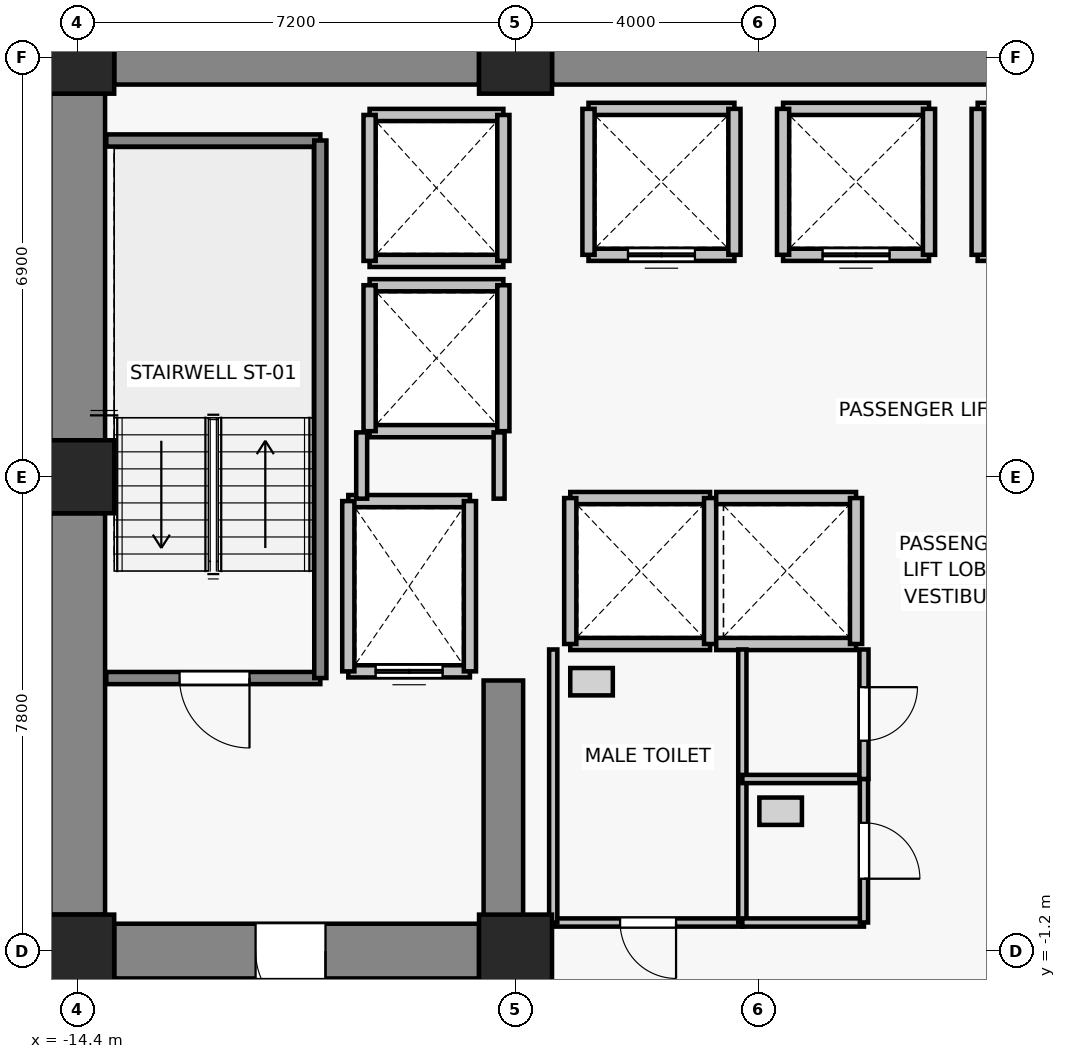
"""IFC4 building model, lengths in metres.
Left out: names, types, materials, properties, quantities, classifications, styles, units other than length and angle.
Written with IfcOpenShell. Run it as: python <this file> out.ifc"""

import sys

from ifc_helpers import new_model, si_unit, direction, frame, frame_2d, origin, origin_2d, place, context, subcontext, project, spatial, rectangle, extrude, source, transform, mapped, element, fill, save


model = new_model("IFC4")
c1 = context("Model", 3, precision=1e-05, world=origin(), true_north=direction((0.0, 1.0)))
c2 = subcontext(c1, "Body", "Model", "MODEL_VIEW")
j1 = project(units=[si_unit("LENGTHUNIT", "METRE"), si_unit("PLANEANGLEUNIT", "RADIAN")], contexts=[c1])
p1 = place(None, origin())
s1 = spatial("IfcSite", under=j1, at=p1, CompositionType="ELEMENT")
p2 = place(p1, origin())
s2 = spatial("IfcBuilding", under=s1, at=p2, CompositionType="ELEMENT")
p3 = place(p2, frame((0.0, 0.0, 67.0)))
s3 = spatial("IfcBuildingStorey", under=s2, at=p3, CompositionType="ELEMENT", Elevation=67.0)
for number, where, z_axis, x_axis in (
    (1, (-14.4, -1.2, 0.0), (0.0, 0.0, 1.0), (1.0, 0.0, 0.0)),
    (2, (-7.2, -1.2, 0.0), (0.0, 0.0, 1.0), (1.0, 0.0, 0.0)),
    (3, (-14.4, 6.6, 0.0), (0.0, 0.0, 1.0), (1.0, 0.0, 0.0)),
    (4, (-14.4, 13.5, 0.0), (0.0, 0.0, 1.0), (1.0, 0.0, 0.0)),
    (5, (-7.2, 13.5, 0.0), (0.0, 0.0, 1.0), (1.0, 0.0, 0.0)),
):
    element("IfcColumn", number, at=place(p3, frame(where, z_axis=z_axis, x_axis=x_axis)), inside=s3, PredefinedType="COLUMN", context=c2, shape_type="SweptSolid", body=[
        extrude(rectangle(XDim=1.2, YDim=1.2, at=origin_2d()), origin(), (0.0, 0.0, 1.0), 3.3),
    ])
p4 = place(p3, frame((-13.8, 13.5, 0.0), z_axis=(0.0, 0.0, 1.0), x_axis=(1.0, 0.0, 0.0)))
e6 = element("IfcWall", 6, at=p4, inside=s3, PredefinedType="SHEAR", context=c2, shape_type="SweptSolid", body=[
    extrude(rectangle(XDim=6.0, YDim=0.9, at=frame_2d((3.0, 0.0))), origin(), (0.0, 0.0, 1.0), 3.075),
])
p5 = place(p3, frame((-6.6, 13.5, 0.0), z_axis=(0.0, 0.0, 1.0), x_axis=(1.0, 0.0, 0.0)))
e7 = element("IfcWall", 7, at=p5, inside=s3, PredefinedType="SHEAR", context=c2, shape_type="SweptSolid", body=[
    extrude(rectangle(XDim=13.2, YDim=0.9, at=frame_2d((6.6, 0.0))), origin(), (0.0, 0.0, 1.0), 3.075),
])
p6 = place(p3, frame((-14.4, -0.6, 0.0), z_axis=(0.0, 0.0, 1.0), x_axis=(0.0, 1.0, 0.0)))
e8 = element("IfcWall", 8, at=p6, inside=s3, PredefinedType="SHEAR", context=c2, shape_type="SweptSolid", body=[
    extrude(rectangle(XDim=6.6, YDim=0.9, at=frame_2d((3.3, 0.0))), origin(), (0.0, 0.0, 1.0), 3.075),
])
p7 = place(p3, frame((-14.4, 7.2, 0.0), z_axis=(0.0, 0.0, 1.0), x_axis=(0.0, 1.0, 0.0)))
e9 = element("IfcWall", 9, at=p7, inside=s3, PredefinedType="SHEAR", context=c2, shape_type="SweptSolid", body=[
    extrude(rectangle(XDim=5.7, YDim=0.9, at=frame_2d((2.85, 0.0))), origin(), (0.0, 0.0, 1.0), 3.075),
])
p8 = place(p3, frame((-7.8, -1.2, 0.0), z_axis=(0.0, 0.0, 1.0), x_axis=(-1.0, 0.0, 0.0)))
e10 = element("IfcWall", 10, at=p8, inside=s3, PredefinedType="SHEAR", context=c2, shape_type="SweptSolid", body=[
    extrude(rectangle(XDim=6.0, YDim=0.9, at=frame_2d((3.0, 0.0))), origin(), (0.0, 0.0, 1.0), 3.075),
])
p9 = place(p8, frame((2.525, 0.0, 0.0)))
e11 = element("IfcOpeningElement", 11, at=p9, cuts=e10, PredefinedType="OPENING", context=c2, shape_type="SweptSolid", body=[
    extrude(rectangle(XDim=1.15, YDim=2.15, at=frame_2d((0.575, 1.075))), frame((0.0, 0.46, 0.0), z_axis=(0.0, -1.0, 0.0), x_axis=(1.0, 0.0, 0.0)), (0.0, 0.0, 1.0), 0.92),
])
p10 = place(p3, frame((-7.4, -0.75, 0.0), z_axis=(0.0, 0.0, 1.0), x_axis=(0.0, 1.0, 0.0)))
e12 = element("IfcWall", 12, at=p10, inside=s3, PredefinedType="SHEAR", context=c2, shape_type="SweptSolid", body=[
    extrude(rectangle(XDim=4.0, YDim=0.65, at=frame_2d((2.0, 0.0))), origin(), (0.0, 0.0, 1.0), 3.075),
])
p11 = place(p3, frame((-7.95, 3.4, 0.0), z_axis=(0.0, 0.0, 1.0), x_axis=(-1.0, 0.0, 0.0)))
e13 = element("IfcWall", 13, at=p11, inside=s3, PredefinedType="SOLIDWALL", context=c2, shape_type="SweptSolid", body=[
    extrude(rectangle(XDim=2.0, YDim=0.2, at=frame_2d((1.0, 0.0))), origin(), (0.0, 0.0, 1.0), 3.075),
])
p12 = place(p11, frame((0.45, 0.0, 0.0)))
e14 = element("IfcOpeningElement", 14, at=p12, cuts=e13, PredefinedType="OPENING", context=c2, shape_type="SweptSolid", body=[
    extrude(rectangle(XDim=1.1, YDim=2.2, at=frame_2d((0.55, 1.1))), frame((0.0, 0.11, 0.0), z_axis=(0.0, -1.0, 0.0), x_axis=(1.0, 0.0, 0.0)), (0.0, 0.0, 1.0), 0.22),
])
p13 = place(p3, frame((-9.95, 6.2, 0.0), z_axis=(0.0, 0.0, 1.0), x_axis=(1.0, 0.0, 0.0)))
e15 = element("IfcWall", 15, at=p13, inside=s3, PredefinedType="SOLIDWALL", context=c2, shape_type="SweptSolid", body=[
    extrude(rectangle(XDim=2.0, YDim=0.2, at=frame_2d((1.0, 0.0))), origin(), (0.0, 0.0, 1.0), 3.075),
])
for number, where, z_axis, x_axis in (
    (16, (-9.95, 3.4, 0.0), (0.0, 0.0, 1.0), (0.0, 1.0, 0.0)),
    (17, (-7.95, 6.2, 0.0), (0.0, 0.0, 1.0), (0.0, -1.0, 0.0)),
):
    element("IfcWall", number, at=place(p3, frame(where, z_axis=z_axis, x_axis=x_axis)), inside=s3, PredefinedType="SOLIDWALL", context=c2, shape_type="SweptSolid", body=[
        extrude(rectangle(XDim=2.8, YDim=0.2, at=frame_2d((1.4, 0.0))), origin(), (0.0, 0.0, 1.0), 3.075),
    ])
p14 = place(p3, frame((-3.6, 10.25, 0.0), z_axis=(0.0, 0.0, 1.0), x_axis=(-1.0, 0.0, 0.0)))
e18 = element("IfcWall", 18, at=p14, inside=s3, PredefinedType="SOLIDWALL", context=c2, shape_type="SweptSolid", body=[
    extrude(rectangle(XDim=2.4, YDim=0.2, at=frame_2d((1.2, 0.0))), origin(), (0.0, 0.0, 1.0), 3.075),
])
p15 = place(p14, frame((0.65, 0.0, 0.0)))
e19 = element("IfcOpeningElement", 19, at=p15, cuts=e18, PredefinedType="OPENING", context=c2, shape_type="SweptSolid", body=[
    extrude(rectangle(XDim=1.1, YDim=2.2, at=frame_2d((0.55, 1.1))), frame((0.0, 0.11, 0.0), z_axis=(0.0, -1.0, 0.0), x_axis=(1.0, 0.0, 0.0)), (0.0, 0.0, 1.0), 0.22),
])
for number, where, z_axis, x_axis in (
    (20, (-6.0, 12.65, 0.0), (0.0, 0.0, 1.0), (1.0, 0.0, 0.0)),
    (21, (-6.0, 10.25, 0.0), (0.0, 0.0, 1.0), (0.0, 1.0, 0.0)),
    (22, (-3.6, 12.65, 0.0), (0.0, 0.0, 1.0), (0.0, -1.0, 0.0)),
):
    element("IfcWall", number, at=place(p3, frame(where, z_axis=z_axis, x_axis=x_axis)), inside=s3, PredefinedType="SOLIDWALL", context=c2, shape_type="SweptSolid", body=[
        extrude(rectangle(XDim=2.4, YDim=0.2, at=frame_2d((1.2, 0.0))), origin(), (0.0, 0.0, 1.0), 3.075),
    ])
p16 = place(p3, frame((-0.4, 10.25, 0.0), z_axis=(0.0, 0.0, 1.0), x_axis=(-1.0, 0.0, 0.0)))
e23 = element("IfcWall", 23, at=p16, inside=s3, PredefinedType="SOLIDWALL", context=c2, shape_type="SweptSolid", body=[
    extrude(rectangle(XDim=2.4, YDim=0.2, at=frame_2d((1.2, 0.0))), origin(), (0.0, 0.0, 1.0), 3.075),
])
p17 = place(p16, frame((0.65, 0.0, 0.0)))
e24 = element("IfcOpeningElement", 24, at=p17, cuts=e23, PredefinedType="OPENING", context=c2, shape_type="SweptSolid", body=[
    extrude(rectangle(XDim=1.1, YDim=2.2, at=frame_2d((0.55, 1.1))), frame((0.0, 0.11, 0.0), z_axis=(0.0, -1.0, 0.0), x_axis=(1.0, 0.0, 0.0)), (0.0, 0.0, 1.0), 0.22),
])
p18 = place(p3, frame((-2.8, 12.65, 0.0), z_axis=(0.0, 0.0, 1.0), x_axis=(1.0, 0.0, 0.0)))
e25 = element("IfcWall", 25, at=p18, inside=s3, PredefinedType="SOLIDWALL", context=c2, shape_type="SweptSolid", body=[
    extrude(rectangle(XDim=2.4, YDim=0.2, at=frame_2d((1.2, 0.0))), origin(), (0.0, 0.0, 1.0), 3.075),
])
for number, where, z_axis, x_axis in (
    (26, (-2.8, 10.25, 0.0), (0.0, 0.0, 1.0), (0.0, 1.0, 0.0)),
    (27, (-0.4, 12.65, 0.0), (0.0, 0.0, 1.0), (0.0, -1.0, 0.0)),
):
    element("IfcWall", number, at=place(p3, frame(where, z_axis=z_axis, x_axis=x_axis)), inside=s3, PredefinedType="SOLIDWALL", context=c2, shape_type="SweptSolid", body=[
        extrude(rectangle(XDim=2.4, YDim=0.2, at=frame_2d((1.2, 0.0))), origin(), (0.0, 0.0, 1.0), 3.075),
    ])
p19 = place(p3, frame((2.8, 10.25, 0.0), z_axis=(0.0, 0.0, 1.0), x_axis=(-1.0, 0.0, 0.0)))
e28 = element("IfcWall", 28, at=p19, inside=s3, PredefinedType="SOLIDWALL", context=c2, shape_type="SweptSolid", body=[
    extrude(rectangle(XDim=2.4, YDim=0.2, at=frame_2d((1.2, 0.0))), origin(), (0.0, 0.0, 1.0), 3.075),
])
p20 = place(p19, frame((0.65, 0.0, 0.0)))
e29 = element("IfcOpeningElement", 29, at=p20, cuts=e28, PredefinedType="OPENING", context=c2, shape_type="SweptSolid", body=[
    extrude(rectangle(XDim=1.1, YDim=2.2, at=frame_2d((0.55, 1.1))), frame((0.0, 0.11, 0.0), z_axis=(0.0, -1.0, 0.0), x_axis=(1.0, 0.0, 0.0)), (0.0, 0.0, 1.0), 0.22),
])
p21 = place(p3, frame((0.4, 12.65, 0.0), z_axis=(0.0, 0.0, 1.0), x_axis=(1.0, 0.0, 0.0)))
e30 = element("IfcWall", 30, at=p21, inside=s3, PredefinedType="SOLIDWALL", context=c2, shape_type="SweptSolid", body=[
    extrude(rectangle(XDim=2.4, YDim=0.2, at=frame_2d((1.2, 0.0))), origin(), (0.0, 0.0, 1.0), 3.075),
])
p22 = place(p3, frame((0.4, 10.25, 0.0), z_axis=(0.0, 0.0, 1.0), x_axis=(0.0, 1.0, 0.0)))
e31 = element("IfcWall", 31, at=p22, inside=s3, PredefinedType="SOLIDWALL", context=c2, shape_type="SweptSolid", body=[
    extrude(rectangle(XDim=2.4, YDim=0.2, at=frame_2d((1.2, 0.0))), origin(), (0.0, 0.0, 1.0), 3.075),
])
for number, where, z_axis, x_axis in (
    (32, (-4.0, 3.85, 0.0), (0.0, 0.0, 1.0), (-1.0, 0.0, 0.0)),
    (33, (-6.3, 6.25, 0.0), (0.0, 0.0, 1.0), (1.0, 0.0, 0.0)),
):
    element("IfcWall", number, at=place(p3, frame(where, z_axis=z_axis, x_axis=x_axis)), inside=s3, PredefinedType="SOLIDWALL", context=c2, shape_type="SweptSolid", body=[
        extrude(rectangle(XDim=2.3, YDim=0.2, at=frame_2d((1.15, 0.0))), origin(), (0.0, 0.0, 1.0), 3.075),
    ])
for number, where, z_axis, x_axis in (
    (34, (-6.3, 3.85, 0.0), (0.0, 0.0, 1.0), (0.0, 1.0, 0.0)),
    (35, (-4.0, 6.25, 0.0), (0.0, 0.0, 1.0), (0.0, -1.0, 0.0)),
):
    element("IfcWall", number, at=place(p3, frame(where, z_axis=z_axis, x_axis=x_axis)), inside=s3, PredefinedType="SOLIDWALL", context=c2, shape_type="SweptSolid", body=[
        extrude(rectangle(XDim=2.4, YDim=0.2, at=frame_2d((1.2, 0.0))), origin(), (0.0, 0.0, 1.0), 3.075),
    ])
for number, where, z_axis, x_axis in (
    (36, (-1.6, 3.85, 0.0), (0.0, 0.0, 1.0), (-1.0, 0.0, 0.0)),
    (37, (-3.9, 6.25, 0.0), (0.0, 0.0, 1.0), (1.0, 0.0, 0.0)),
):
    element("IfcWall", number, at=place(p3, frame(where, z_axis=z_axis, x_axis=x_axis)), inside=s3, PredefinedType="SOLIDWALL", context=c2, shape_type="SweptSolid", body=[
        extrude(rectangle(XDim=2.3, YDim=0.2, at=frame_2d((1.15, 0.0))), origin(), (0.0, 0.0, 1.0), 3.075),
    ])
p23 = place(p3, frame((-1.6, 6.25, 0.0), z_axis=(0.0, 0.0, 1.0), x_axis=(0.0, -1.0, 0.0)))
e38 = element("IfcWall", 38, at=p23, inside=s3, PredefinedType="SOLIDWALL", context=c2, shape_type="SweptSolid", body=[
    extrude(rectangle(XDim=2.4, YDim=0.2, at=frame_2d((1.2, 0.0))), origin(), (0.0, 0.0, 1.0), 3.075),
])
for number, where, z_axis, x_axis in (
    (39, (-7.4, 7.35, 0.0), (0.0, 0.0, 1.0), (-1.0, 0.0, 0.0)),
    (40, (-9.6, 9.75, 0.0), (0.0, 0.0, 1.0), (1.0, 0.0, 0.0)),
):
    element("IfcWall", number, at=place(p3, frame(where, z_axis=z_axis, x_axis=x_axis)), inside=s3, PredefinedType="SOLIDWALL", context=c2, shape_type="SweptSolid", body=[
        extrude(rectangle(XDim=2.2, YDim=0.2, at=frame_2d((1.1, 0.0))), origin(), (0.0, 0.0, 1.0), 2.465),
    ])
p24 = place(p3, frame((-9.6, 7.35, 0.0), z_axis=(0.0, 0.0, 1.0), x_axis=(0.0, 1.0, 0.0)))
e41 = element("IfcWall", 41, at=p24, inside=s3, PredefinedType="SOLIDWALL", context=c2, shape_type="SweptSolid", body=[
    extrude(rectangle(XDim=2.4, YDim=0.2, at=frame_2d((1.2, 0.0))), origin(), (0.0, 0.0, 1.0), 3.075),
])
p25 = place(p3, frame((-7.4, 9.75, 0.0), z_axis=(0.0, 0.0, 1.0), x_axis=(0.0, -1.0, 0.0)))
e42 = element("IfcWall", 42, at=p25, inside=s3, PredefinedType="SOLIDWALL", context=c2, shape_type="SweptSolid", body=[
    extrude(rectangle(XDim=2.4, YDim=0.2, at=frame_2d((1.2, 0.0))), origin(), (0.0, 0.0, 1.0), 2.465),
])
for number, where, z_axis, x_axis in (
    (43, (-7.4, 10.15, 0.0), (0.0, 0.0, 1.0), (-1.0, 0.0, 0.0)),
    (44, (-9.6, 12.55, 0.0), (0.0, 0.0, 1.0), (1.0, 0.0, 0.0)),
):
    element("IfcWall", number, at=place(p3, frame(where, z_axis=z_axis, x_axis=x_axis)), inside=s3, PredefinedType="SOLIDWALL", context=c2, shape_type="SweptSolid", body=[
        extrude(rectangle(XDim=2.2, YDim=0.2, at=frame_2d((1.1, 0.0))), origin(), (0.0, 0.0, 1.0), 2.465),
    ])
p26 = place(p3, frame((-9.6, 10.15, 0.0), z_axis=(0.0, 0.0, 1.0), x_axis=(0.0, 1.0, 0.0)))
e45 = element("IfcWall", 45, at=p26, inside=s3, PredefinedType="SOLIDWALL", context=c2, shape_type="SweptSolid", body=[
    extrude(rectangle(XDim=2.4, YDim=0.2, at=frame_2d((1.2, 0.0))), origin(), (0.0, 0.0, 1.0), 3.075),
])
p27 = place(p3, frame((-7.4, 12.55, 0.0), z_axis=(0.0, 0.0, 1.0), x_axis=(0.0, -1.0, 0.0)))
e46 = element("IfcWall", 46, at=p27, inside=s3, PredefinedType="SOLIDWALL", context=c2, shape_type="SweptSolid", body=[
    extrude(rectangle(XDim=2.4, YDim=0.2, at=frame_2d((1.2, 0.0))), origin(), (0.0, 0.0, 1.0), 2.465),
])
p28 = place(p3, frame((-10.41, 3.29, 0.0), z_axis=(0.0, 0.0, 1.0), x_axis=(-1.0, 0.0, 0.0)))
e47 = element("IfcWall", 47, at=p28, inside=s3, PredefinedType="SOLIDWALL", context=c2, shape_type="SweptSolid", body=[
    extrude(rectangle(XDim=3.52, YDim=0.2, at=frame_2d((1.76, 0.0))), origin(), (0.0, 0.0, 1.0), 3.075),
])
p29 = place(p28, frame((1.165, 0.0, 0.0)))
e48 = element("IfcOpeningElement", 48, at=p29, cuts=e47, PredefinedType="OPENING", context=c2, shape_type="SweptSolid", body=[
    extrude(rectangle(XDim=1.15, YDim=2.15, at=frame_2d((0.575, 1.075))), frame((0.0, 0.11, 0.0), z_axis=(0.0, -1.0, 0.0), x_axis=(1.0, 0.0, 0.0)), (0.0, 0.0, 1.0), 0.22),
])
p30 = place(p3, frame((-13.93, 12.13, 0.0), z_axis=(0.0, 0.0, 1.0), x_axis=(1.0, 0.0, 0.0)))
e49 = element("IfcWall", 49, at=p30, inside=s3, PredefinedType="SOLIDWALL", context=c2, shape_type="SweptSolid", body=[
    extrude(rectangle(XDim=3.52, YDim=0.2, at=frame_2d((1.76, 0.0))), origin(), (0.0, 0.0, 1.0), 3.075),
])
p31 = place(p3, frame((-10.41, 12.13, 0.0), z_axis=(0.0, 0.0, 1.0), x_axis=(0.0, -1.0, 0.0)))
e50 = element("IfcWall", 50, at=p31, inside=s3, PredefinedType="SOLIDWALL", context=c2, shape_type="SweptSolid", body=[
    extrude(rectangle(XDim=8.84, YDim=0.2, at=frame_2d((4.42, 0.0))), origin(), (0.0, 0.0, 1.0), 3.075),
])
p32 = place(p3, frame((-9.73, 6.24, 0.0), z_axis=(0.0, 0.0, 1.0), x_axis=(0.0, 1.0, 0.0)))
e51 = element("IfcWall", 51, at=p32, inside=s3, PredefinedType="PARTITIONING", context=c2, shape_type="SweptSolid", body=[
    extrude(rectangle(XDim=1.09, YDim=0.18, at=frame_2d((0.545, 0.0))), origin(), (0.0, 0.0, 1.0), 3.075),
])
p33 = place(p3, frame((-7.47, 7.33, 0.0), z_axis=(0.0, 0.0, 1.0), x_axis=(0.0, -1.0, 0.0)))
e52 = element("IfcWall", 52, at=p33, inside=s3, PredefinedType="PARTITIONING", context=c2, shape_type="SweptSolid", body=[
    extrude(rectangle(XDim=1.09, YDim=0.18, at=frame_2d((0.545, 0.0))), origin(), (0.0, 0.0, 1.0), 2.465),
])
p34 = place(p3, frame((-3.47, -0.73, 0.0), z_axis=(0.0, 0.0, 1.0), x_axis=(-1.0, 0.0, 0.0)))
e53 = element("IfcWall", 53, at=p34, inside=s3, PredefinedType="PARTITIONING", context=c2, shape_type="SweptSolid", body=[
    extrude(rectangle(XDim=3.11, YDim=0.135, at=frame_2d((1.555, 0.0))), origin(), (0.0, 0.0, 1.0), 3.075),
])
p35 = place(p34, frame((1.09, 0.0, 0.0)))
e54 = element("IfcOpeningElement", 54, at=p35, cuts=e53, PredefinedType="OPENING", context=c2, shape_type="SweptSolid", body=[
    extrude(rectangle(XDim=0.92, YDim=2.1, at=frame_2d((0.46, 1.05))), frame((0.0, 0.077, 0.0), z_axis=(0.0, -1.0, 0.0), x_axis=(1.0, 0.0, 0.0)), (0.0, 0.0, 1.0), 0.155),
])
for number, where, z_axis, x_axis in (
    (55, (-6.58, -0.73, 0.0), (0.0, 0.0, 1.0), (0.0, 1.0, 0.0)),
    (56, (-3.47, 3.76, 0.0), (0.0, 0.0, 1.0), (0.0, -1.0, 0.0)),
):
    element("IfcWall", number, at=place(p3, frame(where, z_axis=z_axis, x_axis=x_axis)), inside=s3, PredefinedType="PARTITIONING", context=c2, shape_type="SweptSolid", body=[
        extrude(rectangle(XDim=4.49, YDim=0.135, at=frame_2d((2.245, 0.0))), origin(), (0.0, 0.0, 1.0), 3.075),
    ])
for number, where, z_axis, x_axis in (
    (57, (-1.47, -0.73, 0.0), (0.0, 0.0, 1.0), (-1.0, 0.0, 0.0)),
    (58, (-3.47, 1.63, 0.0), (0.0, 0.0, 1.0), (1.0, 0.0, 0.0)),
):
    element("IfcWall", number, at=place(p3, frame(where, z_axis=z_axis, x_axis=x_axis)), inside=s3, PredefinedType="PARTITIONING", context=c2, shape_type="SweptSolid", body=[
        extrude(rectangle(XDim=2.0, YDim=0.135, at=frame_2d((1.0, 0.0))), origin(), (0.0, 0.0, 1.0), 3.075),
    ])
p36 = place(p3, frame((-1.47, 1.63, 0.0), z_axis=(0.0, 0.0, 1.0), x_axis=(0.0, -1.0, 0.0)))
e59 = element("IfcWall", 59, at=p36, inside=s3, PredefinedType="PARTITIONING", context=c2, shape_type="SweptSolid", body=[
    extrude(rectangle(XDim=2.36, YDim=0.135, at=frame_2d((1.18, 0.0))), origin(), (0.0, 0.0, 1.0), 3.075),
])
p37 = place(p36, frame((0.72, 0.0, 0.0)))
e60 = element("IfcOpeningElement", 60, at=p37, cuts=e59, PredefinedType="OPENING", context=c2, shape_type="SweptSolid", body=[
    extrude(rectangle(XDim=0.92, YDim=2.1, at=frame_2d((0.46, 1.05))), frame((0.0, 0.077, 0.0), z_axis=(0.0, -1.0, 0.0), x_axis=(1.0, 0.0, 0.0)), (0.0, 0.0, 1.0), 0.155),
])
p38 = place(p3, frame((-1.47, 3.76, 0.0), z_axis=(0.0, 0.0, 1.0), x_axis=(0.0, -1.0, 0.0)))
e61 = element("IfcWall", 61, at=p38, inside=s3, PredefinedType="PARTITIONING", context=c2, shape_type="SweptSolid", body=[
    extrude(rectangle(XDim=2.13, YDim=0.15, at=frame_2d((1.065, 0.0))), origin(), (0.0, 0.0, 1.0), 3.075),
])
p39 = place(p38, frame((0.62, 0.0, 0.0)))
e62 = element("IfcOpeningElement", 62, at=p39, cuts=e61, PredefinedType="OPENING", context=c2, shape_type="SweptSolid", body=[
    extrude(rectangle(XDim=0.88, YDim=2.1, at=frame_2d((0.44, 1.05))), frame((0.0, 0.085, 0.0), z_axis=(0.0, -1.0, 0.0), x_axis=(1.0, 0.0, 0.0)), (0.0, 0.0, 1.0), 0.17),
])
m1 = source(origin(), c2, "Body", "SweptSolid", [
    extrude(rectangle(XDim=1.1, YDim=2.2, at=frame_2d((0.55, 1.1))), frame((0.0, 0.025, 0.0), z_axis=(0.0, -1.0, 0.0), x_axis=(1.0, 0.0, 0.0)), (0.0, 0.0, 1.0), 0.05),
])
p40 = place(p12, origin())
e63 = element("IfcDoor", 63, at=p40, inside=s3, OperationType="DOUBLE_DOOR_SLIDING", PredefinedType="DOOR", context=c2, shape_type="MappedRepresentation", body=[
    mapped(m1, transform((0.0, 0.0, 0.0), x_axis=(1.0, 0.0, 0.0), y_axis=(0.0, 1.0, 0.0), z_axis=(0.0, 0.0, 1.0), scale=1.0)),
])
fill(e14, e63)
p41 = place(p15, origin())
e64 = element("IfcDoor", 64, at=p41, inside=s3, OperationType="DOUBLE_DOOR_SLIDING", PredefinedType="DOOR", context=c2, shape_type="MappedRepresentation", body=[
    mapped(m1, transform((0.0, 0.0, 0.0), x_axis=(1.0, 0.0, 0.0), y_axis=(0.0, 1.0, 0.0), z_axis=(0.0, 0.0, 1.0), scale=1.0)),
])
fill(e19, e64)
p42 = place(p17, origin())
e65 = element("IfcDoor", 65, at=p42, inside=s3, OperationType="DOUBLE_DOOR_SLIDING", PredefinedType="DOOR", context=c2, shape_type="MappedRepresentation", body=[
    mapped(m1, transform((0.0, 0.0, 0.0), x_axis=(1.0, 0.0, 0.0), y_axis=(0.0, 1.0, 0.0), z_axis=(0.0, 0.0, 1.0), scale=1.0)),
])
fill(e24, e65)
m2 = source(origin(), c2, "Body", "SweptSolid", [
    extrude(rectangle(XDim=1.15, YDim=2.15, at=frame_2d((0.575, 1.075))), frame((0.0, 0.025, 0.0), z_axis=(0.0, -1.0, 0.0), x_axis=(1.0, 0.0, 0.0)), (0.0, 0.0, 1.0), 0.05),
])
p43 = place(p29, origin())
e66 = element("IfcDoor", 66, at=p43, inside=s3, OperationType="SINGLE_SWING_LEFT", PredefinedType="DOOR", context=c2, shape_type="MappedRepresentation", body=[
    mapped(m2, transform((0.0, 0.0, 0.0), x_axis=(1.0, 0.0, 0.0), y_axis=(0.0, 1.0, 0.0), z_axis=(0.0, 0.0, 1.0), scale=1.0)),
])
fill(e48, e66)
p44 = place(p9, origin())
e67 = element("IfcDoor", 67, at=p44, inside=s3, OperationType="SINGLE_SWING_LEFT", PredefinedType="DOOR", context=c2, shape_type="MappedRepresentation", body=[
    mapped(m2, transform((0.0, 0.0, 0.0), x_axis=(1.0, 0.0, 0.0), y_axis=(0.0, 1.0, 0.0), z_axis=(0.0, 0.0, 1.0), scale=1.0)),
])
fill(e11, e67)
m3 = source(origin(), c2, "Body", "SweptSolid", [
    extrude(rectangle(XDim=0.92, YDim=2.1, at=frame_2d((0.46, 1.05))), frame((0.0, 0.025, 0.0), z_axis=(0.0, -1.0, 0.0), x_axis=(1.0, 0.0, 0.0)), (0.0, 0.0, 1.0), 0.05),
])
p45 = place(p35, origin())
e68 = element("IfcDoor", 68, at=p45, inside=s3, OperationType="SINGLE_SWING_LEFT", PredefinedType="DOOR", context=c2, shape_type="MappedRepresentation", body=[
    mapped(m3, transform((0.0, 0.0, 0.0), x_axis=(1.0, 0.0, 0.0), y_axis=(0.0, 1.0, 0.0), z_axis=(0.0, 0.0, 1.0), scale=1.0)),
])
fill(e54, e68)
p46 = place(p37, origin())
e69 = element("IfcDoor", 69, at=p46, inside=s3, OperationType="SINGLE_SWING_RIGHT", PredefinedType="DOOR", context=c2, shape_type="MappedRepresentation", body=[
    mapped(m3, transform((0.0, 0.0, 0.0), x_axis=(1.0, 0.0, 0.0), y_axis=(0.0, 1.0, 0.0), z_axis=(0.0, 0.0, 1.0), scale=1.0)),
])
fill(e60, e69)
m4 = source(origin(), c2, "Body", "SweptSolid", [
    extrude(rectangle(XDim=0.88, YDim=2.1, at=frame_2d((0.44, 1.05))), frame((0.0, 0.025, 0.0), z_axis=(0.0, -1.0, 0.0), x_axis=(1.0, 0.0, 0.0)), (0.0, 0.0, 1.0), 0.05),
])
p47 = place(p39, origin())
e70 = element("IfcDoor", 70, at=p47, inside=s3, OperationType="SINGLE_SWING_LEFT", PredefinedType="DOOR", context=c2, shape_type="MappedRepresentation", body=[
    mapped(m4, transform((0.0, 0.0, 0.0), x_axis=(1.0, 0.0, 0.0), y_axis=(0.0, 1.0, 0.0), z_axis=(0.0, 0.0, 1.0), scale=1.0)),
])
fill(e62, e70)
save(model, sys.argv[1])
